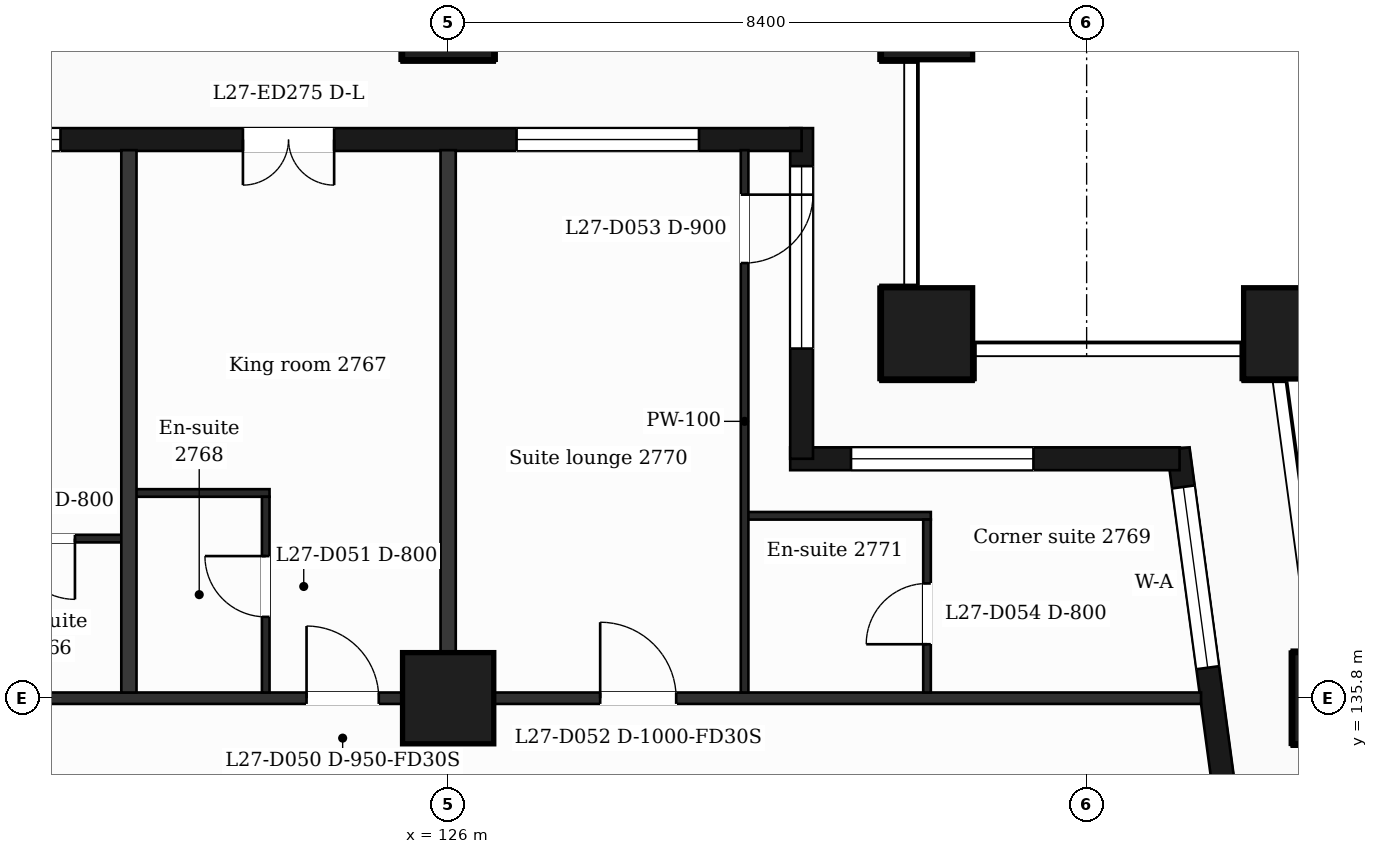
"""IFC4 building model, lengths in metres.
Left out: names, types, materials, properties, quantities, classifications, styles, units other than length and angle.
Written with IfcOpenShell. Run it as: python <this file> out.ifc"""

import sys

from ifc_helpers import new_model, si_unit, direction, frame, frame_2d, origin, origin_2d, place, context, subcontext, project, spatial, rectangle, extrude, element, fill, save


model = new_model("IFC4")
c1 = context("Model", 3, precision=1e-05, world=origin(), true_north=direction((0.0, 1.0)))
c2 = subcontext(c1, "Body", "Model", "MODEL_VIEW")
j1 = project(units=[si_unit("LENGTHUNIT", "METRE"), si_unit("PLANEANGLEUNIT", "RADIAN")], contexts=[c1])
p1 = place(None, origin())
s1 = spatial("IfcSite", under=j1, at=p1, CompositionType="ELEMENT")
p2 = place(p1, origin())
s2 = spatial("IfcBuilding", under=s1, at=p2, CompositionType="ELEMENT")
p3 = place(p2, frame((0.0, 0.0, 116.9)))
s3 = spatial("IfcBuildingStorey", under=s2, at=p3, CompositionType="ELEMENT", Elevation=116.9)
for number, where, z_axis, x_axis in (
    (1, (132.3, 140.6, 0.0), (0.0, 0.0, 1.0), (1.0, 0.0, 0.0)),
    (2, (137.065, 140.6, 0.0), (0.0, 0.0, 1.0), (1.0, 0.0, 0.0)),
    (3, (126.0, 135.8, 0.0), (0.0, 0.0, 1.0), (1.0, 0.0, 0.0)),
    (4, (137.711, 135.8, 0.0), (0.0, 0.0, 1.0), (1.0, 0.0, 0.0)),
    (5, (126.0, 144.8, 0.0), (0.0, 0.0, 1.0), (1.0, 0.0, 0.0)),
    (6, (132.3, 144.8, 0.0), (0.0, 0.0, 1.0), (1.0, 0.0, 0.0)),
):
    element("IfcColumn", number, at=place(p3, frame(where, z_axis=z_axis, x_axis=x_axis)), inside=s3, PredefinedType="COLUMN", context=c2, shape_type="SweptSolid", body=[
        extrude(rectangle(XDim=1.2, YDim=1.2, at=origin_2d()), origin(), (0.0, 0.0, 1.0), 3.7),
    ])
p4 = place(p3, frame((136.504, 132.4, 0.0), z_axis=(0.0, 0.0, 1.0), x_axis=(-0.133399697462, 0.99106231929, 0.0)))
e7 = element("IfcWall", 7, at=p4, inside=s3, PredefinedType="SOLIDWALL", context=c2, shape_type="SweptSolid", body=[
    extrude(rectangle(XDim=6.74, YDim=0.3, at=frame_2d((3.37, 0.0))), origin(), (0.0, 0.0, 1.0), 3.38),
])
p5 = place(p4, frame((1.115, 0.0, 0.0)))
e8 = element("IfcOpeningElement", 8, at=p5, cuts=e7, PredefinedType="OPENING", context=c2, shape_type="SweptSolid", body=[
    extrude(rectangle(XDim=1.2, YDim=2.4, at=frame_2d((0.6, 1.2))), frame((0.0, 0.16, 0.0), z_axis=(0.0, -1.0, 0.0), x_axis=(1.0, 0.0, 0.0)), (0.0, 0.0, 1.0), 0.32),
])
p6 = place(p4, frame((3.835, 0.0, 0.9)))
e9 = element("IfcOpeningElement", 9, at=p6, cuts=e7, PredefinedType="OPENING", context=c2, shape_type="SweptSolid", body=[
    extrude(rectangle(XDim=2.4, YDim=2.1, at=frame_2d((1.2, 1.05))), frame((0.0, 0.16, 0.0), z_axis=(0.0, -1.0, 0.0), x_axis=(1.0, 0.0, 0.0)), (0.0, 0.0, 1.0), 0.32),
])
p7 = place(p3, frame((135.623, 138.95, 0.0), z_axis=(0.0, 0.0, 1.0), x_axis=(-1.0, 0.0, 0.0)))
e10 = element("IfcWall", 10, at=p7, inside=s3, PredefinedType="SOLIDWALL", context=c2, shape_type="SweptSolid", body=[
    extrude(rectangle(XDim=5.123, YDim=0.3, at=frame_2d((2.561, 0.0))), origin(), (0.0, 0.0, 1.0), 3.38),
])
p8 = place(p7, frame((1.923, 0.0, 0.9)))
e11 = element("IfcOpeningElement", 11, at=p8, cuts=e10, PredefinedType="OPENING", context=c2, shape_type="SweptSolid", body=[
    extrude(rectangle(XDim=2.4, YDim=2.1, at=frame_2d((1.2, 1.05))), frame((0.0, 0.16, 0.0), z_axis=(0.0, -1.0, 0.0), x_axis=(1.0, 0.0, 0.0)), (0.0, 0.0, 1.0), 0.32),
])
p9 = place(p3, frame((130.65, 138.95, 0.0), z_axis=(0.0, 0.0, 1.0), x_axis=(0.0, 1.0, 0.0)))
e12 = element("IfcWall", 12, at=p9, inside=s3, PredefinedType="SOLIDWALL", context=c2, shape_type="SweptSolid", body=[
    extrude(rectangle(XDim=4.35, YDim=0.3, at=frame_2d((2.175, 0.0))), origin(), (0.0, 0.0, 1.0), 3.38),
])
p10 = place(p9, frame((1.45, 0.0, 0.9)))
e13 = element("IfcOpeningElement", 13, at=p10, cuts=e12, PredefinedType="OPENING", context=c2, shape_type="SweptSolid", body=[
    extrude(rectangle(XDim=2.4, YDim=2.1, at=frame_2d((1.2, 1.05))), frame((0.0, 0.16, 0.0), z_axis=(0.0, -1.0, 0.0), x_axis=(1.0, 0.0, 0.0)), (0.0, 0.0, 1.0), 0.32),
])
p11 = place(p3, frame((130.65, 143.15, 0.0), z_axis=(0.0, 0.0, 1.0), x_axis=(-1.0, 0.0, 0.0)))
e14 = element("IfcWall", 14, at=p11, inside=s3, PredefinedType="SOLIDWALL", context=c2, shape_type="SweptSolid", body=[
    extrude(rectangle(XDim=14.25, YDim=0.3, at=frame_2d((7.125, 0.0))), origin(), (0.0, 0.0, 1.0), 3.38),
])
p12 = place(p11, frame((1.35, 0.0, 0.9)))
e15 = element("IfcOpeningElement", 15, at=p12, cuts=e14, PredefinedType="OPENING", context=c2, shape_type="SweptSolid", body=[
    extrude(rectangle(XDim=2.4, YDim=2.1, at=frame_2d((1.2, 1.05))), frame((0.0, 0.16, 0.0), z_axis=(0.0, -1.0, 0.0), x_axis=(1.0, 0.0, 0.0)), (0.0, 0.0, 1.0), 0.32),
])
p13 = place(p11, frame((6.15, 0.0, 0.0)))
e16 = element("IfcOpeningElement", 16, at=p13, cuts=e14, PredefinedType="OPENING", context=c2, shape_type="SweptSolid", body=[
    extrude(rectangle(XDim=1.2, YDim=2.4, at=frame_2d((0.6, 1.2))), frame((0.0, 0.16, 0.0), z_axis=(0.0, -1.0, 0.0), x_axis=(1.0, 0.0, 0.0)), (0.0, 0.0, 1.0), 0.32),
])
p14 = place(p11, frame((9.75, 0.0, 0.9)))
e17 = element("IfcOpeningElement", 17, at=p14, cuts=e14, PredefinedType="OPENING", context=c2, shape_type="SweptSolid", body=[
    extrude(rectangle(XDim=2.4, YDim=2.1, at=frame_2d((1.2, 1.05))), frame((0.0, 0.16, 0.0), z_axis=(0.0, -1.0, 0.0), x_axis=(1.0, 0.0, 0.0)), (0.0, 0.0, 1.0), 0.32),
])
p15 = place(p3, frame((90.895, 135.8, 0.0), z_axis=(0.0, 0.0, 1.0), x_axis=(1.0, 0.0, 0.0)))
e18 = element("IfcWall", 18, at=p15, inside=s3, PredefinedType="PARTITIONING", context=c2, shape_type="SweptSolid", body=[
    extrude(rectangle(XDim=45.011, YDim=0.15, at=frame_2d((22.505, 0.0))), origin(), (0.0, 0.0, 1.0), 3.38),
])
p16 = place(p15, frame((8.005, 0.0, 0.0)))
e19 = element("IfcOpeningElement", 19, at=p16, cuts=e18, PredefinedType="OPENING", context=c2, shape_type="SweptSolid", body=[
    extrude(rectangle(XDim=1.0, YDim=2.1, at=frame_2d((0.5, 1.05))), frame((0.0, 0.085, 0.0), z_axis=(0.0, -1.0, 0.0), x_axis=(1.0, 0.0, 0.0)), (0.0, 0.0, 1.0), 0.17),
])
p17 = place(p15, frame((11.785, 0.0, 0.0)))
e20 = element("IfcOpeningElement", 20, at=p17, cuts=e18, PredefinedType="OPENING", context=c2, shape_type="SweptSolid", body=[
    extrude(rectangle(XDim=0.95, YDim=2.1, at=frame_2d((0.475, 1.05))), frame((0.0, 0.085, 0.0), z_axis=(0.0, -1.0, 0.0), x_axis=(1.0, 0.0, 0.0)), (0.0, 0.0, 1.0), 0.17),
])
p18 = place(p15, frame((14.38, 0.0, 0.0)))
e21 = element("IfcOpeningElement", 21, at=p18, cuts=e18, PredefinedType="OPENING", context=c2, shape_type="SweptSolid", body=[
    extrude(rectangle(XDim=0.95, YDim=2.1, at=frame_2d((0.475, 1.05))), frame((0.0, 0.085, 0.0), z_axis=(0.0, -1.0, 0.0), x_axis=(1.0, 0.0, 0.0)), (0.0, 0.0, 1.0), 0.17),
])
p19 = place(p15, frame((19.075, 0.0, 0.0)))
e22 = element("IfcOpeningElement", 22, at=p19, cuts=e18, PredefinedType="OPENING", context=c2, shape_type="SweptSolid", body=[
    extrude(rectangle(XDim=0.95, YDim=2.1, at=frame_2d((0.475, 1.05))), frame((0.0, 0.085, 0.0), z_axis=(0.0, -1.0, 0.0), x_axis=(1.0, 0.0, 0.0)), (0.0, 0.0, 1.0), 0.17),
])
p20 = place(p15, frame((24.855, 0.0, 0.0)))
e23 = element("IfcOpeningElement", 23, at=p20, cuts=e18, PredefinedType="OPENING", context=c2, shape_type="SweptSolid", body=[
    extrude(rectangle(XDim=1.0, YDim=2.1, at=frame_2d((0.5, 1.05))), frame((0.0, 0.085, 0.0), z_axis=(0.0, -1.0, 0.0), x_axis=(1.0, 0.0, 0.0)), (0.0, 0.0, 1.0), 0.17),
])
p21 = place(p15, frame((27.515, 0.0, 0.0)))
e24 = element("IfcOpeningElement", 24, at=p21, cuts=e18, PredefinedType="OPENING", context=c2, shape_type="SweptSolid", body=[
    extrude(rectangle(XDim=0.95, YDim=2.1, at=frame_2d((0.475, 1.05))), frame((0.0, 0.085, 0.0), z_axis=(0.0, -1.0, 0.0), x_axis=(1.0, 0.0, 0.0)), (0.0, 0.0, 1.0), 0.17),
])
p22 = place(p15, frame((33.242, 0.0, 0.0)))
e25 = element("IfcOpeningElement", 25, at=p22, cuts=e18, PredefinedType="OPENING", context=c2, shape_type="SweptSolid", body=[
    extrude(rectangle(XDim=0.95, YDim=2.1, at=frame_2d((0.475, 1.05))), frame((0.0, 0.085, 0.0), z_axis=(0.0, -1.0, 0.0), x_axis=(1.0, 0.0, 0.0)), (0.0, 0.0, 1.0), 0.17),
])
p23 = place(p15, frame((37.105, 0.0, 0.0)))
e26 = element("IfcOpeningElement", 26, at=p23, cuts=e18, PredefinedType="OPENING", context=c2, shape_type="SweptSolid", body=[
    extrude(rectangle(XDim=1.0, YDim=2.1, at=frame_2d((0.5, 1.05))), frame((0.0, 0.085, 0.0), z_axis=(0.0, -1.0, 0.0), x_axis=(1.0, 0.0, 0.0)), (0.0, 0.0, 1.0), 0.17),
])
p24 = place(p3, frame((119.65, 137.9, 0.0), z_axis=(0.0, 0.0, 1.0), x_axis=(1.0, 0.0, 0.0)))
e27 = element("IfcWall", 27, at=p24, inside=s3, PredefinedType="PARTITIONING", context=c2, shape_type="SweptSolid", body=[
    extrude(rectangle(XDim=2.15, YDim=0.1, at=frame_2d((1.075, 0.0))), origin(), (0.0, 0.0, 1.0), 3.38),
])
p25 = place(p24, frame((0.64, 0.0, 0.0)))
e28 = element("IfcOpeningElement", 28, at=p25, cuts=e27, PredefinedType="OPENING", context=c2, shape_type="SweptSolid", body=[
    extrude(rectangle(XDim=0.8, YDim=2.1, at=frame_2d((0.4, 1.05))), frame((0.0, 0.06, 0.0), z_axis=(0.0, -1.0, 0.0), x_axis=(1.0, 0.0, 0.0)), (0.0, 0.0, 1.0), 0.12),
])
p26 = place(p3, frame((129.9, 138.2, 0.0), z_axis=(0.0, 0.0, 1.0), x_axis=(1.0, 0.0, 0.0)))
e29 = element("IfcWall", 29, at=p26, inside=s3, PredefinedType="PARTITIONING", context=c2, shape_type="SweptSolid", body=[
    extrude(rectangle(XDim=2.45, YDim=0.1, at=frame_2d((1.225, 0.0))), origin(), (0.0, 0.0, 1.0), 3.38),
])
p27 = place(p3, frame((121.8, 138.5, 0.0), z_axis=(0.0, 0.0, 1.0), x_axis=(1.0, 0.0, 0.0)))
e30 = element("IfcWall", 30, at=p27, inside=s3, PredefinedType="PARTITIONING", context=c2, shape_type="SweptSolid", body=[
    extrude(rectangle(XDim=1.85, YDim=0.1, at=frame_2d((0.925, 0.0))), origin(), (0.0, 0.0, 1.0), 3.38),
])
p28 = place(p3, frame((121.8, 135.875, 0.0), z_axis=(0.0, 0.0, 1.0), x_axis=(0.0, 1.0, 0.0)))
e31 = element("IfcWall", 31, at=p28, inside=s3, PredefinedType="PARTITIONING", context=c2, shape_type="SweptSolid", body=[
    extrude(rectangle(XDim=7.135, YDim=0.2, at=frame_2d((3.567, 0.0))), origin(), (0.0, 0.0, 1.0), 3.38),
])
p29 = place(p3, frame((123.6, 135.875, 0.0), z_axis=(0.0, 0.0, 1.0), x_axis=(0.0, 1.0, 0.0)))
e32 = element("IfcWall", 32, at=p29, inside=s3, PredefinedType="PARTITIONING", context=c2, shape_type="SweptSolid", body=[
    extrude(rectangle(XDim=2.575, YDim=0.1, at=frame_2d((1.288, 0.0))), origin(), (0.0, 0.0, 1.0), 3.38),
])
p30 = place(p29, frame((0.995, 0.0, 0.0)))
e33 = element("IfcOpeningElement", 33, at=p30, cuts=e32, PredefinedType="OPENING", context=c2, shape_type="SweptSolid", body=[
    extrude(rectangle(XDim=0.8, YDim=2.1, at=frame_2d((0.4, 1.05))), frame((0.0, 0.06, 0.0), z_axis=(0.0, -1.0, 0.0), x_axis=(1.0, 0.0, 0.0)), (0.0, 0.0, 1.0), 0.12),
])
p31 = place(p3, frame((126.0, 135.875, 0.0), z_axis=(0.0, 0.0, 1.0), x_axis=(0.0, 1.0, 0.0)))
e34 = element("IfcWall", 34, at=p31, inside=s3, PredefinedType="PARTITIONING", context=c2, shape_type="SweptSolid", body=[
    extrude(rectangle(XDim=7.135, YDim=0.2, at=frame_2d((3.567, 0.0))), origin(), (0.0, 0.0, 1.0), 3.38),
])
p32 = place(p3, frame((129.9, 135.875, 0.0), z_axis=(0.0, 0.0, 1.0), x_axis=(0.0, 1.0, 0.0)))
e35 = element("IfcWall", 35, at=p32, inside=s3, PredefinedType="PARTITIONING", context=c2, shape_type="SweptSolid", body=[
    extrude(rectangle(XDim=7.135, YDim=0.1, at=frame_2d((3.567, 0.0))), origin(), (0.0, 0.0, 1.0), 3.38),
])
p33 = place(p32, frame((5.65, 0.0, 0.0)))
e36 = element("IfcOpeningElement", 36, at=p33, cuts=e35, PredefinedType="OPENING", context=c2, shape_type="SweptSolid", body=[
    extrude(rectangle(XDim=0.9, YDim=2.1, at=frame_2d((0.45, 1.05))), frame((0.0, 0.06, 0.0), z_axis=(0.0, -1.0, 0.0), x_axis=(1.0, 0.0, 0.0)), (0.0, 0.0, 1.0), 0.12),
])
p34 = place(p3, frame((132.3, 135.875, 0.0), z_axis=(0.0, 0.0, 1.0), x_axis=(0.0, 1.0, 0.0)))
e37 = element("IfcWall", 37, at=p34, inside=s3, PredefinedType="PARTITIONING", context=c2, shape_type="SweptSolid", body=[
    extrude(rectangle(XDim=2.275, YDim=0.1, at=frame_2d((1.137, 0.0))), origin(), (0.0, 0.0, 1.0), 3.38),
])
p35 = place(p34, frame((0.635, 0.0, 0.0)))
e38 = element("IfcOpeningElement", 38, at=p35, cuts=e37, PredefinedType="OPENING", context=c2, shape_type="SweptSolid", body=[
    extrude(rectangle(XDim=0.8, YDim=2.1, at=frame_2d((0.4, 1.05))), frame((0.0, 0.06, 0.0), z_axis=(0.0, -1.0, 0.0), x_axis=(1.0, 0.0, 0.0)), (0.0, 0.0, 1.0), 0.12),
])
p36 = place(p6, origin())
e39 = element("IfcWindow", 39, at=p36, inside=s3, PartitioningType="SINGLE_PANEL", PredefinedType="WINDOW", context=c2, shape_type="SweptSolid", body=[
    extrude(rectangle(XDim=2.4, YDim=2.1, at=frame_2d((1.2, 1.05))), frame((0.0, 0.03, 0.0), z_axis=(0.0, -1.0, 0.0), x_axis=(1.0, 0.0, 0.0)), (0.0, 0.0, 1.0), 0.06),
])
fill(e9, e39)
p37 = place(p8, origin())
e40 = element("IfcWindow", 40, at=p37, inside=s3, PartitioningType="SINGLE_PANEL", PredefinedType="WINDOW", context=c2, shape_type="SweptSolid", body=[
    extrude(rectangle(XDim=2.4, YDim=2.1, at=frame_2d((1.2, 1.05))), frame((0.0, 0.03, 0.0), z_axis=(0.0, -1.0, 0.0), x_axis=(1.0, 0.0, 0.0)), (0.0, 0.0, 1.0), 0.06),
])
fill(e11, e40)
p38 = place(p10, origin())
e41 = element("IfcWindow", 41, at=p38, inside=s3, PartitioningType="SINGLE_PANEL", PredefinedType="WINDOW", context=c2, shape_type="SweptSolid", body=[
    extrude(rectangle(XDim=2.4, YDim=2.1, at=frame_2d((1.2, 1.05))), frame((0.0, 0.03, 0.0), z_axis=(0.0, -1.0, 0.0), x_axis=(1.0, 0.0, 0.0)), (0.0, 0.0, 1.0), 0.06),
])
fill(e13, e41)
p39 = place(p12, origin())
e42 = element("IfcWindow", 42, at=p39, inside=s3, PartitioningType="SINGLE_PANEL", PredefinedType="WINDOW", context=c2, shape_type="SweptSolid", body=[
    extrude(rectangle(XDim=2.4, YDim=2.1, at=frame_2d((1.2, 1.05))), frame((0.0, 0.03, 0.0), z_axis=(0.0, -1.0, 0.0), x_axis=(1.0, 0.0, 0.0)), (0.0, 0.0, 1.0), 0.06),
])
fill(e15, e42)
p40 = place(p13, origin())
e43 = element("IfcDoor", 43, at=p40, inside=s3, OperationType="DOUBLE_DOOR_SINGLE_SWING", PredefinedType="DOOR", context=c2, shape_type="SweptSolid", body=[
    extrude(rectangle(XDim=1.2, YDim=2.4, at=frame_2d((0.6, 1.2))), frame((0.0, 0.025, 0.0), z_axis=(0.0, -1.0, 0.0), x_axis=(1.0, 0.0, 0.0)), (0.0, 0.0, 1.0), 0.05),
])
fill(e16, e43)
p41 = place(p14, origin())
e44 = element("IfcWindow", 44, at=p41, inside=s3, PartitioningType="SINGLE_PANEL", PredefinedType="WINDOW", context=c2, shape_type="SweptSolid", body=[
    extrude(rectangle(XDim=2.4, YDim=2.1, at=frame_2d((1.2, 1.05))), frame((0.0, 0.03, 0.0), z_axis=(0.0, -1.0, 0.0), x_axis=(1.0, 0.0, 0.0)), (0.0, 0.0, 1.0), 0.06),
])
fill(e17, e44)
p42 = place(p25, origin())
e45 = element("IfcDoor", 45, at=p42, inside=s3, OperationType="SINGLE_SWING_RIGHT", PredefinedType="DOOR", context=c2, shape_type="SweptSolid", body=[
    extrude(rectangle(XDim=0.8, YDim=2.1, at=frame_2d((0.4, 1.05))), frame((0.0, 0.025, 0.0), z_axis=(0.0, -1.0, 0.0), x_axis=(1.0, 0.0, 0.0)), (0.0, 0.0, 1.0), 0.05),
])
fill(e28, e45)
p43 = place(p22, origin())
e46 = element("IfcDoor", 46, at=p43, inside=s3, OperationType="SINGLE_SWING_LEFT", PredefinedType="DOOR", context=c2, shape_type="SweptSolid", body=[
    extrude(rectangle(XDim=0.95, YDim=2.1, at=frame_2d((0.475, 1.05))), frame((0.0, 0.025, 0.0), z_axis=(0.0, -1.0, 0.0), x_axis=(1.0, 0.0, 0.0)), (0.0, 0.0, 1.0), 0.05),
])
fill(e25, e46)
p44 = place(p30, origin())
e47 = element("IfcDoor", 47, at=p44, inside=s3, OperationType="SINGLE_SWING_RIGHT", PredefinedType="DOOR", context=c2, shape_type="SweptSolid", body=[
    extrude(rectangle(XDim=0.8, YDim=2.1, at=frame_2d((0.4, 1.05))), frame((0.0, 0.025, 0.0), z_axis=(0.0, -1.0, 0.0), x_axis=(1.0, 0.0, 0.0)), (0.0, 0.0, 1.0), 0.05),
])
fill(e33, e47)
p45 = place(p23, origin())
e48 = element("IfcDoor", 48, at=p45, inside=s3, OperationType="SINGLE_SWING_LEFT", PredefinedType="DOOR", context=c2, shape_type="SweptSolid", body=[
    extrude(rectangle(XDim=1.0, YDim=2.1, at=frame_2d((0.5, 1.05))), frame((0.0, 0.025, 0.0), z_axis=(0.0, -1.0, 0.0), x_axis=(1.0, 0.0, 0.0)), (0.0, 0.0, 1.0), 0.05),
])
fill(e26, e48)
p46 = place(p33, origin())
e49 = element("IfcDoor", 49, at=p46, inside=s3, OperationType="SINGLE_SWING_RIGHT", PredefinedType="DOOR", context=c2, shape_type="SweptSolid", body=[
    extrude(rectangle(XDim=0.9, YDim=2.1, at=frame_2d((0.45, 1.05))), frame((0.0, 0.025, 0.0), z_axis=(0.0, -1.0, 0.0), x_axis=(1.0, 0.0, 0.0)), (0.0, 0.0, 1.0), 0.05),
])
fill(e36, e49)
p47 = place(p35, origin())
e50 = element("IfcDoor", 50, at=p47, inside=s3, OperationType="SINGLE_SWING_LEFT", PredefinedType="DOOR", context=c2, shape_type="SweptSolid", body=[
    extrude(rectangle(XDim=0.8, YDim=2.1, at=frame_2d((0.4, 1.05))), frame((0.0, 0.025, 0.0), z_axis=(0.0, -1.0, 0.0), x_axis=(1.0, 0.0, 0.0)), (0.0, 0.0, 1.0), 0.05),
])
fill(e38, e50)
save(model, sys.argv[1])
